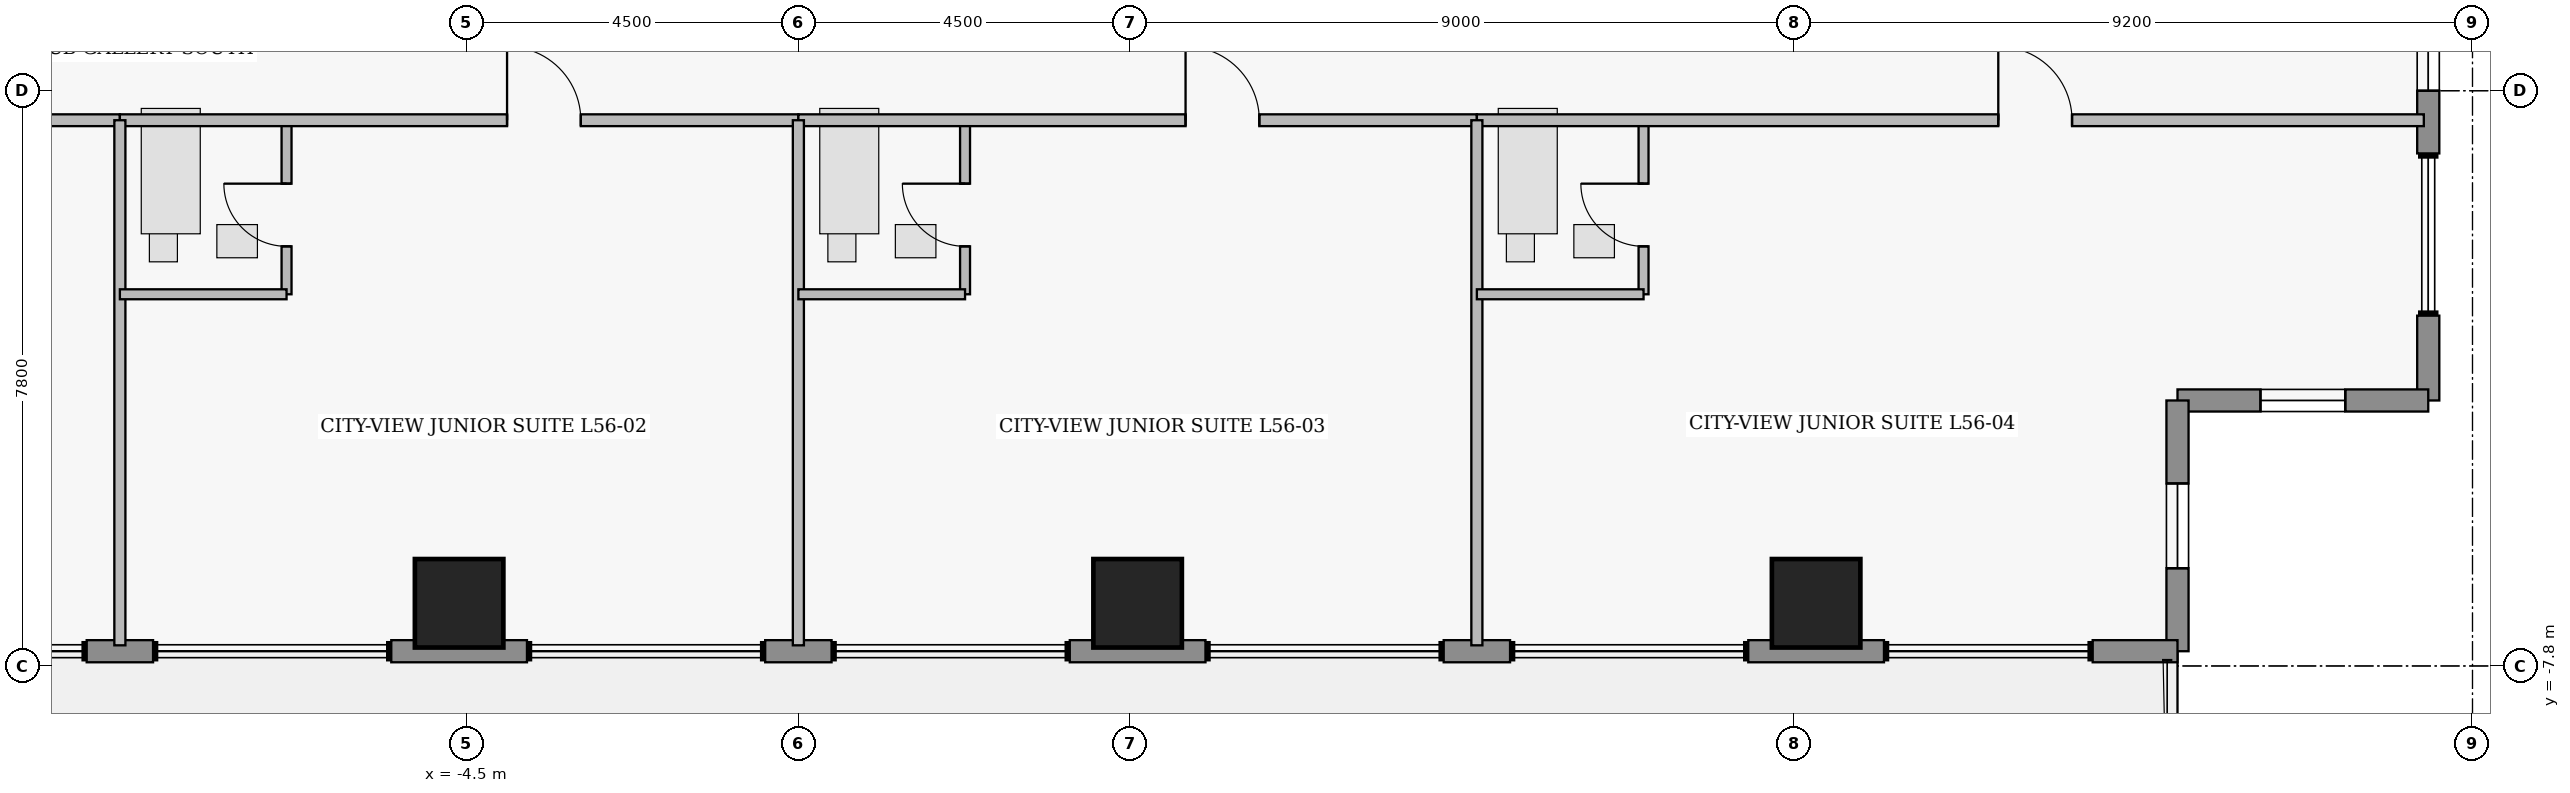
"""IFC4 building model, lengths in metres.
Left out: names, types, materials, properties, quantities, classifications, styles, units other than length and angle.
Written with IfcOpenShell. Run it as: python <this file> out.ifc"""

import sys

from ifc_helpers import new_model, si_unit, direction, frame, frame_2d, origin, origin_2d, place, context, subcontext, project, spatial, rectangle, extrude, element, fill, save


model = new_model("IFC4")
c1 = context("Model", 3, precision=1e-05, world=origin(), true_north=direction((0.0, 1.0)))
c2 = subcontext(c1, "Body", "Model", "MODEL_VIEW")
j1 = project(units=[si_unit("LENGTHUNIT", "METRE"), si_unit("PLANEANGLEUNIT", "RADIAN")], contexts=[c1])
p1 = place(None, origin())
s1 = spatial("IfcSite", under=j1, at=p1, CompositionType="ELEMENT")
p2 = place(p1, origin())
s2 = spatial("IfcBuilding", under=s1, at=p2, CompositionType="ELEMENT")
p3 = place(p2, frame((0.0, 0.0, 222.4)))
s3 = spatial("IfcBuildingStorey", under=s2, at=p3, CompositionType="ELEMENT", Elevation=222.4)
for number, where, z_axis, x_axis in (
    (1, (-4.6, -6.95, 0.0), (0.0, 0.0, 1.0), (1.0, 0.0, 0.0)),
    (2, (4.6, -6.95, 0.0), (0.0, 0.0, 1.0), (1.0, 0.0, 0.0)),
    (3, (13.8, -6.95, 0.0), (0.0, 0.0, 1.0), (1.0, 0.0, 0.0)),
):
    element("IfcColumn", number, at=place(p3, frame(where, z_axis=z_axis, x_axis=x_axis)), inside=s3, PredefinedType="COLUMN", context=c2, shape_type="SweptSolid", body=[
        extrude(rectangle(XDim=1.2, YDim=1.2, at=origin_2d()), origin(), (0.0, 0.0, 1.0), 3.75),
    ])
p4 = place(p3, frame((22.1, 2.0, 0.0), z_axis=(0.0, 0.0, 1.0), x_axis=(0.0, -1.0, 0.0)))
e4 = element("IfcWall", 4, at=p4, inside=s3, PredefinedType="STANDARD", context=c2, shape_type="SweptSolid", body=[
    extrude(rectangle(XDim=2.85, YDim=0.3, at=frame_2d((1.425, 0.0))), origin(), (0.0, 0.0, 1.0), 3.53),
])
p5 = place(p4, frame((0.85, 0.0, 0.95)))
e5 = element("IfcOpeningElement", 5, at=p5, cuts=e4, PredefinedType="OPENING", context=c2, shape_type="SweptSolid", body=[
    extrude(rectangle(XDim=1.15, YDim=1.55, at=frame_2d((0.575, 0.775))), frame((0.0, 0.16, 0.0), z_axis=(0.0, -1.0, 0.0), x_axis=(1.0, 0.0, 0.0)), (0.0, 0.0, 1.0), 0.32),
])
p6 = place(p3, frame((22.1, -3.05, 0.0), z_axis=(0.0, 0.0, 1.0), x_axis=(0.0, -1.0, 0.0)))
e6 = element("IfcWall", 6, at=p6, inside=s3, PredefinedType="STANDARD", context=c2, shape_type="SweptSolid", body=[
    extrude(rectangle(XDim=1.15, YDim=0.3, at=frame_2d((0.575, 0.0))), origin(), (0.0, 0.0, 1.0), 3.53),
])
p7 = place(p3, frame((22.1, -4.2, 0.0), z_axis=(0.0, 0.0, 1.0), x_axis=(-1.0, 0.0, 0.0)))
e7 = element("IfcWall", 7, at=p7, inside=s3, PredefinedType="STANDARD", context=c2, shape_type="SweptSolid", body=[
    extrude(rectangle(XDim=3.4, YDim=0.3, at=frame_2d((1.7, 0.0))), origin(), (0.0, 0.0, 1.0), 3.53),
])
p8 = place(p7, frame((1.125, 0.0, 1.25)))
e8 = element("IfcOpeningElement", 8, at=p8, cuts=e7, PredefinedType="OPENING", context=c2, shape_type="SweptSolid", body=[
    extrude(rectangle(XDim=1.15, YDim=1.55, at=frame_2d((0.575, 0.775))), frame((0.0, 0.16, 0.0), z_axis=(0.0, -1.0, 0.0), x_axis=(1.0, 0.0, 0.0)), (0.0, 0.0, 1.0), 0.32),
])
p9 = place(p3, frame((18.7, -4.2, 0.0), z_axis=(0.0, 0.0, 1.0), x_axis=(0.0, -1.0, 0.0)))
e9 = element("IfcWall", 9, at=p9, inside=s3, PredefinedType="STANDARD", context=c2, shape_type="SweptSolid", body=[
    extrude(rectangle(XDim=3.4, YDim=0.3, at=frame_2d((1.7, 0.0))), origin(), (0.0, 0.0, 1.0), 3.53),
])
p10 = place(p9, frame((1.125, 0.0, 1.25)))
e10 = element("IfcOpeningElement", 10, at=p10, cuts=e9, PredefinedType="OPENING", context=c2, shape_type="SweptSolid", body=[
    extrude(rectangle(XDim=1.15, YDim=1.55, at=frame_2d((0.575, 0.775))), frame((0.0, 0.16, 0.0), z_axis=(0.0, -1.0, 0.0), x_axis=(1.0, 0.0, 0.0)), (0.0, 0.0, 1.0), 0.32),
])
p11 = place(p3, frame((18.7, -7.6, 0.0), z_axis=(0.0, 0.0, 1.0), x_axis=(-1.0, 0.0, 0.0)))
e11 = element("IfcWall", 11, at=p11, inside=s3, PredefinedType="STANDARD", context=c2, shape_type="SweptSolid", body=[
    extrude(rectangle(XDim=1.15, YDim=0.3, at=frame_2d((0.575, 0.0))), origin(), (0.0, 0.0, 1.0), 3.53),
])
p12 = place(p3, frame((14.72, -7.6, 0.0), z_axis=(0.0, 0.0, 1.0), x_axis=(-1.0, 0.0, 0.0)))
e12 = element("IfcWall", 12, at=p12, inside=s3, PredefinedType="STANDARD", context=c2, shape_type="SweptSolid", body=[
    extrude(rectangle(XDim=1.84, YDim=0.3, at=frame_2d((0.92, 0.0))), origin(), (0.0, 0.0, 1.0), 3.53),
])
p13 = place(p3, frame((9.65, -7.6, 0.0), z_axis=(0.0, 0.0, 1.0), x_axis=(-1.0, 0.0, 0.0)))
e13 = element("IfcWall", 13, at=p13, inside=s3, PredefinedType="STANDARD", context=c2, shape_type="SweptSolid", body=[
    extrude(rectangle(XDim=0.9, YDim=0.3, at=frame_2d((0.45, 0.0))), origin(), (0.0, 0.0, 1.0), 3.53),
])
p14 = place(p3, frame((5.52, -7.6, 0.0), z_axis=(0.0, 0.0, 1.0), x_axis=(-1.0, 0.0, 0.0)))
e14 = element("IfcWall", 14, at=p14, inside=s3, PredefinedType="STANDARD", context=c2, shape_type="SweptSolid", body=[
    extrude(rectangle(XDim=1.84, YDim=0.3, at=frame_2d((0.92, 0.0))), origin(), (0.0, 0.0, 1.0), 3.53),
])
p15 = place(p3, frame((0.45, -7.6, 0.0), z_axis=(0.0, 0.0, 1.0), x_axis=(-1.0, 0.0, 0.0)))
e15 = element("IfcWall", 15, at=p15, inside=s3, PredefinedType="STANDARD", context=c2, shape_type="SweptSolid", body=[
    extrude(rectangle(XDim=0.9, YDim=0.3, at=frame_2d((0.45, 0.0))), origin(), (0.0, 0.0, 1.0), 3.53),
])
p16 = place(p3, frame((-3.68, -7.6, 0.0), z_axis=(0.0, 0.0, 1.0), x_axis=(-1.0, 0.0, 0.0)))
e16 = element("IfcWall", 16, at=p16, inside=s3, PredefinedType="STANDARD", context=c2, shape_type="SweptSolid", body=[
    extrude(rectangle(XDim=1.84, YDim=0.3, at=frame_2d((0.92, 0.0))), origin(), (0.0, 0.0, 1.0), 3.53),
])
p17 = place(p3, frame((-8.75, -7.6, 0.0), z_axis=(0.0, 0.0, 1.0), x_axis=(-1.0, 0.0, 0.0)))
e17 = element("IfcWall", 17, at=p17, inside=s3, PredefinedType="STANDARD", context=c2, shape_type="SweptSolid", body=[
    extrude(rectangle(XDim=0.9, YDim=0.3, at=frame_2d((0.45, 0.0))), origin(), (0.0, 0.0, 1.0), 3.53),
])
p18 = place(p3, frame((-22.04, -0.4, 0.0), z_axis=(0.0, 0.0, 1.0), x_axis=(1.0, 0.0, 0.0)))
e18 = element("IfcWall", 18, at=p18, inside=s3, PredefinedType="PARTITIONING", context=c2, shape_type="SweptSolid", body=[
    extrude(rectangle(XDim=12.84, YDim=0.16, at=frame_2d((6.42, 0.0))), origin(), (0.0, 0.0, 1.0), 3.53),
])
p19 = place(p18, frame((7.07, 0.0, 0.0)))
e19 = element("IfcOpeningElement", 19, at=p19, cuts=e18, PredefinedType="OPENING", context=c2, shape_type="SweptSolid", body=[
    extrude(rectangle(XDim=1.0, YDim=2.15, at=frame_2d((0.5, 1.075))), frame((0.0, 0.09, 0.0), z_axis=(0.0, -1.0, 0.0), x_axis=(1.0, 0.0, 0.0)), (0.0, 0.0, 1.0), 0.18),
])
p20 = place(p3, frame((-6.94, -2.76, 0.0), z_axis=(0.0, 0.0, 1.0), x_axis=(0.0, 1.0, 0.0)))
e20 = element("IfcWall", 20, at=p20, inside=s3, PredefinedType="PLUMBINGWALL", context=c2, shape_type="SweptSolid", body=[
    extrude(rectangle(XDim=2.36, YDim=0.135, at=frame_2d((1.18, 0.0))), origin(), (0.0, 0.0, 1.0), 3.53),
])
p21 = place(p20, frame((0.65, 0.0, 0.0)))
e21 = element("IfcOpeningElement", 21, at=p21, cuts=e20, PredefinedType="OPENING", context=c2, shape_type="SweptSolid", body=[
    extrude(rectangle(XDim=0.85, YDim=2.1, at=frame_2d((0.425, 1.05))), frame((0.0, 0.077, 0.0), z_axis=(0.0, -1.0, 0.0), x_axis=(1.0, 0.0, 0.0)), (0.0, 0.0, 1.0), 0.155),
])
p22 = place(p3, frame((-9.2, -0.4, 0.0), z_axis=(0.0, 0.0, 1.0), x_axis=(1.0, 0.0, 0.0)))
e22 = element("IfcWall", 22, at=p22, inside=s3, PredefinedType="PARTITIONING", context=c2, shape_type="SweptSolid", body=[
    extrude(rectangle(XDim=9.2, YDim=0.16, at=frame_2d((4.6, 0.0))), origin(), (0.0, 0.0, 1.0), 3.53),
])
p23 = place(p22, frame((5.25, 0.0, 0.0)))
e23 = element("IfcOpeningElement", 23, at=p23, cuts=e22, PredefinedType="OPENING", context=c2, shape_type="SweptSolid", body=[
    extrude(rectangle(XDim=1.0, YDim=2.15, at=frame_2d((0.5, 1.075))), frame((0.0, 0.09, 0.0), z_axis=(0.0, -1.0, 0.0), x_axis=(1.0, 0.0, 0.0)), (0.0, 0.0, 1.0), 0.18),
])
p24 = place(p3, frame((2.26, -2.76, 0.0), z_axis=(0.0, 0.0, 1.0), x_axis=(0.0, 1.0, 0.0)))
e24 = element("IfcWall", 24, at=p24, inside=s3, PredefinedType="PLUMBINGWALL", context=c2, shape_type="SweptSolid", body=[
    extrude(rectangle(XDim=2.36, YDim=0.135, at=frame_2d((1.18, 0.0))), origin(), (0.0, 0.0, 1.0), 3.53),
])
p25 = place(p24, frame((0.65, 0.0, 0.0)))
e25 = element("IfcOpeningElement", 25, at=p25, cuts=e24, PredefinedType="OPENING", context=c2, shape_type="SweptSolid", body=[
    extrude(rectangle(XDim=0.85, YDim=2.1, at=frame_2d((0.425, 1.05))), frame((0.0, 0.077, 0.0), z_axis=(0.0, -1.0, 0.0), x_axis=(1.0, 0.0, 0.0)), (0.0, 0.0, 1.0), 0.155),
])
p26 = place(p3, frame((0.0, -0.4, 0.0), z_axis=(0.0, 0.0, 1.0), x_axis=(1.0, 0.0, 0.0)))
e26 = element("IfcWall", 26, at=p26, inside=s3, PredefinedType="PARTITIONING", context=c2, shape_type="SweptSolid", body=[
    extrude(rectangle(XDim=9.2, YDim=0.16, at=frame_2d((4.6, 0.0))), origin(), (0.0, 0.0, 1.0), 3.53),
])
p27 = place(p26, frame((5.25, 0.0, 0.0)))
e27 = element("IfcOpeningElement", 27, at=p27, cuts=e26, PredefinedType="OPENING", context=c2, shape_type="SweptSolid", body=[
    extrude(rectangle(XDim=1.0, YDim=2.15, at=frame_2d((0.5, 1.075))), frame((0.0, 0.09, 0.0), z_axis=(0.0, -1.0, 0.0), x_axis=(1.0, 0.0, 0.0)), (0.0, 0.0, 1.0), 0.18),
])
p28 = place(p3, frame((11.46, -2.76, 0.0), z_axis=(0.0, 0.0, 1.0), x_axis=(0.0, 1.0, 0.0)))
e28 = element("IfcWall", 28, at=p28, inside=s3, PredefinedType="PLUMBINGWALL", context=c2, shape_type="SweptSolid", body=[
    extrude(rectangle(XDim=2.36, YDim=0.135, at=frame_2d((1.18, 0.0))), origin(), (0.0, 0.0, 1.0), 3.53),
])
p29 = place(p28, frame((0.65, 0.0, 0.0)))
e29 = element("IfcOpeningElement", 29, at=p29, cuts=e28, PredefinedType="OPENING", context=c2, shape_type="SweptSolid", body=[
    extrude(rectangle(XDim=0.85, YDim=2.1, at=frame_2d((0.425, 1.05))), frame((0.0, 0.077, 0.0), z_axis=(0.0, -1.0, 0.0), x_axis=(1.0, 0.0, 0.0)), (0.0, 0.0, 1.0), 0.155),
])
p30 = place(p3, frame((9.2, -0.4, 0.0), z_axis=(0.0, 0.0, 1.0), x_axis=(1.0, 0.0, 0.0)))
e30 = element("IfcWall", 30, at=p30, inside=s3, PredefinedType="PARTITIONING", context=c2, shape_type="SweptSolid", body=[
    extrude(rectangle(XDim=12.84, YDim=0.16, at=frame_2d((6.42, 0.0))), origin(), (0.0, 0.0, 1.0), 3.53),
])
p31 = place(p30, frame((7.07, 0.0, 0.0)))
e31 = element("IfcOpeningElement", 31, at=p31, cuts=e30, PredefinedType="OPENING", context=c2, shape_type="SweptSolid", body=[
    extrude(rectangle(XDim=1.0, YDim=2.15, at=frame_2d((0.5, 1.075))), frame((0.0, 0.09, 0.0), z_axis=(0.0, -1.0, 0.0), x_axis=(1.0, 0.0, 0.0)), (0.0, 0.0, 1.0), 0.18),
])
p32 = place(p3, frame((-9.2, -7.52, 0.0), z_axis=(0.0, 0.0, 1.0), x_axis=(0.0, 1.0, 0.0)))
e32 = element("IfcWall", 32, at=p32, inside=s3, PredefinedType="PARTITIONING", context=c2, shape_type="SweptSolid", body=[
    extrude(rectangle(XDim=7.12, YDim=0.15, at=frame_2d((3.56, 0.0))), origin(), (0.0, 0.0, 1.0), 3.53),
])
p33 = place(p3, frame((-9.2, -2.76, 0.0), z_axis=(0.0, 0.0, 1.0), x_axis=(1.0, 0.0, 0.0)))
e33 = element("IfcWall", 33, at=p33, inside=s3, PredefinedType="PLUMBINGWALL", context=c2, shape_type="SweptSolid", body=[
    extrude(rectangle(XDim=2.26, YDim=0.135, at=frame_2d((1.13, 0.0))), origin(), (0.0, 0.0, 1.0), 3.124),
])
p34 = place(p3, frame((0.0, -7.52, 0.0), z_axis=(0.0, 0.0, 1.0), x_axis=(0.0, 1.0, 0.0)))
e34 = element("IfcWall", 34, at=p34, inside=s3, PredefinedType="PARTITIONING", context=c2, shape_type="SweptSolid", body=[
    extrude(rectangle(XDim=7.12, YDim=0.15, at=frame_2d((3.56, 0.0))), origin(), (0.0, 0.0, 1.0), 3.53),
])
p35 = place(p3, frame((0.0, -2.76, 0.0), z_axis=(0.0, 0.0, 1.0), x_axis=(1.0, 0.0, 0.0)))
e35 = element("IfcWall", 35, at=p35, inside=s3, PredefinedType="PLUMBINGWALL", context=c2, shape_type="SweptSolid", body=[
    extrude(rectangle(XDim=2.26, YDim=0.135, at=frame_2d((1.13, 0.0))), origin(), (0.0, 0.0, 1.0), 3.124),
])
p36 = place(p3, frame((9.2, -7.52, 0.0), z_axis=(0.0, 0.0, 1.0), x_axis=(0.0, 1.0, 0.0)))
e36 = element("IfcWall", 36, at=p36, inside=s3, PredefinedType="PARTITIONING", context=c2, shape_type="SweptSolid", body=[
    extrude(rectangle(XDim=7.12, YDim=0.15, at=frame_2d((3.56, 0.0))), origin(), (0.0, 0.0, 1.0), 3.53),
])
p37 = place(p3, frame((9.2, -2.76, 0.0), z_axis=(0.0, 0.0, 1.0), x_axis=(1.0, 0.0, 0.0)))
e37 = element("IfcWall", 37, at=p37, inside=s3, PredefinedType="PLUMBINGWALL", context=c2, shape_type="SweptSolid", body=[
    extrude(rectangle(XDim=2.26, YDim=0.135, at=frame_2d((1.13, 0.0))), origin(), (0.0, 0.0, 1.0), 3.124),
])
p38 = place(p5, origin())
e38 = element("IfcWindow", 38, at=p38, inside=s3, PartitioningType="SINGLE_PANEL", PredefinedType="WINDOW", context=c2, shape_type="SweptSolid", body=[
    extrude(rectangle(XDim=1.15, YDim=1.55, at=frame_2d((0.575, 0.775))), frame((0.0, 0.03, 0.0), z_axis=(0.0, -1.0, 0.0), x_axis=(1.0, 0.0, 0.0)), (0.0, 0.0, 1.0), 0.06),
])
fill(e5, e38)
p39 = place(p8, origin())
e39 = element("IfcWindow", 39, at=p39, inside=s3, PartitioningType="SINGLE_PANEL", PredefinedType="WINDOW", context=c2, shape_type="SweptSolid", body=[
    extrude(rectangle(XDim=1.15, YDim=1.55, at=frame_2d((0.575, 0.775))), frame((0.0, 0.03, 0.0), z_axis=(0.0, -1.0, 0.0), x_axis=(1.0, 0.0, 0.0)), (0.0, 0.0, 1.0), 0.06),
])
fill(e8, e39)
p40 = place(p10, origin())
e40 = element("IfcWindow", 40, at=p40, inside=s3, PartitioningType="SINGLE_PANEL", PredefinedType="WINDOW", context=c2, shape_type="SweptSolid", body=[
    extrude(rectangle(XDim=1.15, YDim=1.55, at=frame_2d((0.575, 0.775))), frame((0.0, 0.03, 0.0), z_axis=(0.0, -1.0, 0.0), x_axis=(1.0, 0.0, 0.0)), (0.0, 0.0, 1.0), 0.06),
])
fill(e10, e40)
p41 = place(p21, origin())
e41 = element("IfcDoor", 41, at=p41, inside=s3, OperationType="SINGLE_SWING_RIGHT", PredefinedType="DOOR", context=c2, shape_type="SweptSolid", body=[
    extrude(rectangle(XDim=0.85, YDim=2.1, at=frame_2d((0.425, 1.05))), frame((0.0, 0.025, 0.0), z_axis=(0.0, -1.0, 0.0), x_axis=(1.0, 0.0, 0.0)), (0.0, 0.0, 1.0), 0.05),
])
fill(e21, e41)
p42 = place(p23, origin())
e42 = element("IfcDoor", 42, at=p42, inside=s3, OperationType="SINGLE_SWING_LEFT", PredefinedType="DOOR", context=c2, shape_type="SweptSolid", body=[
    extrude(rectangle(XDim=1.0, YDim=2.15, at=frame_2d((0.5, 1.075))), frame((0.0, 0.025, 0.0), z_axis=(0.0, -1.0, 0.0), x_axis=(1.0, 0.0, 0.0)), (0.0, 0.0, 1.0), 0.05),
])
fill(e23, e42)
p43 = place(p25, origin())
e43 = element("IfcDoor", 43, at=p43, inside=s3, OperationType="SINGLE_SWING_RIGHT", PredefinedType="DOOR", context=c2, shape_type="SweptSolid", body=[
    extrude(rectangle(XDim=0.85, YDim=2.1, at=frame_2d((0.425, 1.05))), frame((0.0, 0.025, 0.0), z_axis=(0.0, -1.0, 0.0), x_axis=(1.0, 0.0, 0.0)), (0.0, 0.0, 1.0), 0.05),
])
fill(e25, e43)
p44 = place(p27, origin())
e44 = element("IfcDoor", 44, at=p44, inside=s3, OperationType="SINGLE_SWING_LEFT", PredefinedType="DOOR", context=c2, shape_type="SweptSolid", body=[
    extrude(rectangle(XDim=1.0, YDim=2.15, at=frame_2d((0.5, 1.075))), frame((0.0, 0.025, 0.0), z_axis=(0.0, -1.0, 0.0), x_axis=(1.0, 0.0, 0.0)), (0.0, 0.0, 1.0), 0.05),
])
fill(e27, e44)
p45 = place(p29, origin())
e45 = element("IfcDoor", 45, at=p45, inside=s3, OperationType="SINGLE_SWING_RIGHT", PredefinedType="DOOR", context=c2, shape_type="SweptSolid", body=[
    extrude(rectangle(XDim=0.85, YDim=2.1, at=frame_2d((0.425, 1.05))), frame((0.0, 0.025, 0.0), z_axis=(0.0, -1.0, 0.0), x_axis=(1.0, 0.0, 0.0)), (0.0, 0.0, 1.0), 0.05),
])
fill(e29, e45)
p46 = place(p31, origin())
e46 = element("IfcDoor", 46, at=p46, inside=s3, OperationType="SINGLE_SWING_LEFT", PredefinedType="DOOR", context=c2, shape_type="SweptSolid", body=[
    extrude(rectangle(XDim=1.0, YDim=2.15, at=frame_2d((0.5, 1.075))), frame((0.0, 0.025, 0.0), z_axis=(0.0, -1.0, 0.0), x_axis=(1.0, 0.0, 0.0)), (0.0, 0.0, 1.0), 0.05),
])
fill(e31, e46)
save(model, sys.argv[1])
